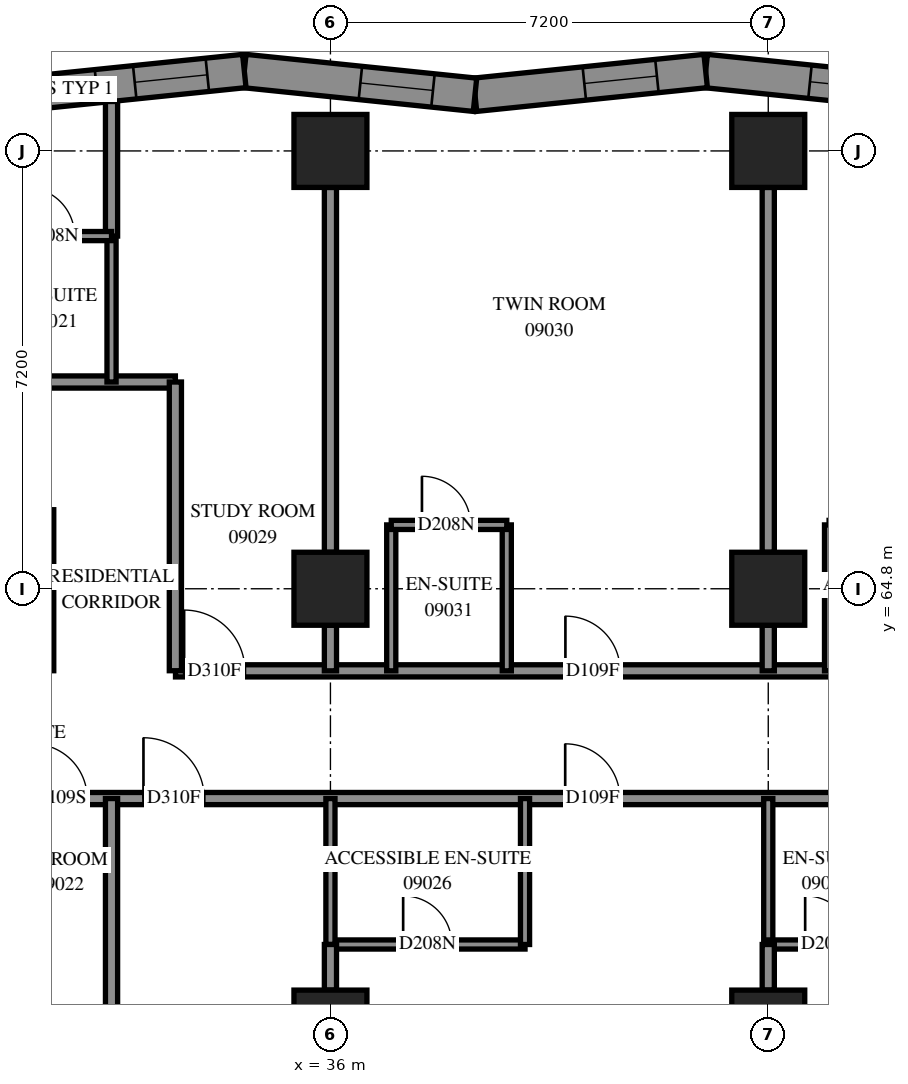
"""IFC4 building model, lengths in metres.
Left out: names, types, materials, properties, quantities, classifications, styles, units other than length and angle.
Written with IfcOpenShell. Run it as: python <this file> out.ifc"""

import sys

from ifc_helpers import new_model, si_unit, direction, frame, frame_2d, origin, origin_2d, place, context, subcontext, project, spatial, polyline, rectangle, outline, extrude, element, fill, save


model = new_model("IFC4")
c1 = context("Model", 3, precision=1e-05, world=origin(), true_north=direction((0.0, 1.0)))
c2 = subcontext(c1, "Body", "Model", "MODEL_VIEW")
j1 = project(units=[si_unit("LENGTHUNIT", "METRE"), si_unit("PLANEANGLEUNIT", "RADIAN")], contexts=[c1])
p1 = place(None, origin())
s1 = spatial("IfcSite", under=j1, at=p1, CompositionType="ELEMENT")
p2 = place(p1, origin())
s2 = spatial("IfcBuilding", under=s1, at=p2, CompositionType="ELEMENT")
p3 = place(p2, frame((0.0, 0.0, 37.2)))
s3 = spatial("IfcBuildingStorey", under=s2, at=p3, CompositionType="ELEMENT", Elevation=37.2)
for number, where, z_axis, x_axis in (
    (1, (36.0, 57.6, 0.0), (0.0, 0.0, 1.0), (1.0, 0.0, 0.0)),
    (2, (36.0, 64.8, 0.0), (0.0, 0.0, 1.0), (1.0, 0.0, 0.0)),
    (3, (36.0, 72.0, 0.0), (0.0, 0.0, 1.0), (1.0, 0.0, 0.0)),
    (4, (43.2, 57.6, 0.0), (0.0, 0.0, 1.0), (1.0, 0.0, 0.0)),
    (5, (43.2, 64.8, 0.0), (0.0, 0.0, 1.0), (1.0, 0.0, 0.0)),
    (6, (43.2, 72.0, 0.0), (0.0, 0.0, 1.0), (1.0, 0.0, 0.0)),
):
    element("IfcColumn", number, at=place(p3, frame(where, z_axis=z_axis, x_axis=x_axis)), inside=s3, PredefinedType="COLUMN", context=c2, shape_type="SweptSolid", body=[
        extrude(rectangle(XDim=1.2, YDim=1.2, at=origin_2d()), origin(), (0.0, 0.0, 1.0), 3.1),
    ])
p4 = place(p3, frame((45.965, 72.924, 0.0), z_axis=(0.0, 0.0, 1.0), x_axis=(-0.9947304076, 0.1025251975, 0.0)))
e7 = element("IfcWall", 7, at=p4, inside=s3, PredefinedType="SOLIDWALL", context=c2, shape_type="SweptSolid", body=[
    extrude(outline(polyline([(0.028, -0.275), (3.842, -0.275), (3.785, 0.275), (-0.028, 0.275), (0.028, -0.275)])), origin(), (0.0, 0.0, 1.0), 3.1),
])
p5 = place(p4, frame((0.89, 0.0, 0.5)))
e8 = element("IfcOpeningElement", 8, at=p5, cuts=e7, PredefinedType="OPENING", context=c2, shape_type="SweptSolid", body=[
    extrude(rectangle(XDim=1.2, YDim=2.45, at=frame_2d((0.6, 1.225))), frame((0.0, 0.285, 0.0), z_axis=(0.0, -1.0, 0.0), x_axis=(1.0, 0.0, 0.0)), (0.0, 0.0, 1.0), 0.57),
])
p6 = place(p3, frame((42.171, 73.314, 0.0), z_axis=(0.0, 0.0, 1.0), x_axis=(-0.9947306832, -0.1025225234, 0.0)))
e9 = element("IfcWall", 9, at=p6, inside=s3, PredefinedType="SOLIDWALL", context=c2, shape_type="SweptSolid", body=[
    extrude(outline(polyline([(-0.028, -0.275), (3.785, -0.275), (3.842, 0.275), (0.028, 0.275), (-0.028, -0.275)])), origin(), (0.0, 0.0, 1.0), 3.1),
])
p7 = place(p6, frame((0.806, 0.0, 0.5)))
e10 = element("IfcOpeningElement", 10, at=p7, cuts=e9, PredefinedType="OPENING", context=c2, shape_type="SweptSolid", body=[
    extrude(rectangle(XDim=1.2, YDim=2.45, at=frame_2d((0.6, 1.225))), frame((0.0, 0.285, 0.0), z_axis=(0.0, -1.0, 0.0), x_axis=(1.0, 0.0, 0.0)), (0.0, 0.0, 1.0), 0.57),
])
p8 = place(p3, frame((38.377, 72.924, 0.0), z_axis=(0.0, 0.0, 1.0), x_axis=(-0.9947306832, 0.1025225234, 0.0)))
e11 = element("IfcWall", 11, at=p8, inside=s3, PredefinedType="SOLIDWALL", context=c2, shape_type="SweptSolid", body=[
    extrude(outline(polyline([(0.028, -0.275), (3.842, -0.275), (3.785, 0.275), (-0.028, 0.275), (0.028, -0.275)])), origin(), (0.0, 0.0, 1.0), 3.1),
])
p9 = place(p8, frame((0.695, 0.0, 0.5)))
e12 = element("IfcOpeningElement", 12, at=p9, cuts=e11, PredefinedType="OPENING", context=c2, shape_type="SweptSolid", body=[
    extrude(rectangle(XDim=1.2, YDim=2.45, at=frame_2d((0.6, 1.225))), frame((0.0, 0.285, 0.0), z_axis=(0.0, -1.0, 0.0), x_axis=(1.0, 0.0, 0.0)), (0.0, 0.0, 1.0), 0.57),
])
p10 = place(p3, frame((34.584, 73.314, 0.0), z_axis=(0.0, 0.0, 1.0), x_axis=(-0.9947304076, -0.1025251975, 0.0)))
e13 = element("IfcWall", 13, at=p10, inside=s3, PredefinedType="SOLIDWALL", context=c2, shape_type="SweptSolid", body=[
    extrude(outline(polyline([(-0.028, -0.275), (3.785, -0.275), (3.842, 0.275), (0.028, 0.275), (-0.028, -0.275)])), origin(), (0.0, 0.0, 1.0), 3.1),
])
p11 = place(p10, frame((0.612, 0.0, 0.5)))
e14 = element("IfcOpeningElement", 14, at=p11, cuts=e13, PredefinedType="OPENING", context=c2, shape_type="SweptSolid", body=[
    extrude(rectangle(XDim=1.2, YDim=2.45, at=frame_2d((0.6, 1.225))), frame((0.0, 0.285, 0.0), z_axis=(0.0, -1.0, 0.0), x_axis=(1.0, 0.0, 0.0)), (0.0, 0.0, 1.0), 0.57),
])
p12 = place(p10, frame((2.444, 0.0, 0.45)))
e15 = element("IfcOpeningElement", 15, at=p12, cuts=e13, PredefinedType="OPENING", context=c2, shape_type="SweptSolid", body=[
    extrude(rectangle(XDim=1.0, YDim=2.5, at=frame_2d((0.5, 1.25))), frame((0.0, 0.285, 0.0), z_axis=(0.0, -1.0, 0.0), x_axis=(1.0, 0.0, 0.0)), (0.0, 0.0, 1.0), 0.57),
])
p13 = place(p3, frame((28.8, 61.35, 0.0), z_axis=(0.0, 0.0, 1.0), x_axis=(1.0, 0.0, 0.0)))
e16 = element("IfcWall", 16, at=p13, inside=s3, PredefinedType="PARTITIONING", context=c2, shape_type="SweptSolid", body=[
    extrude(rectangle(XDim=24.15, YDim=0.2, at=frame_2d((12.075, 0.0))), origin(), (0.0, 0.0, 1.0), 3.1),
])
p14 = place(p13, frame((2.3, 0.0, 0.0)))
e17 = element("IfcOpeningElement", 17, at=p14, cuts=e16, PredefinedType="OPENING", context=c2, shape_type="SweptSolid", body=[
    extrude(rectangle(XDim=0.9, YDim=2.1, at=frame_2d((0.45, 1.05))), frame((0.0, 0.11, 0.0), z_axis=(0.0, -1.0, 0.0), x_axis=(1.0, 0.0, 0.0)), (0.0, 0.0, 1.0), 0.22),
])
p15 = place(p13, frame((4.125, 0.0, 0.0)))
e18 = element("IfcOpeningElement", 18, at=p15, cuts=e16, PredefinedType="OPENING", context=c2, shape_type="SweptSolid", body=[
    extrude(rectangle(XDim=1.0, YDim=2.1, at=frame_2d((0.5, 1.05))), frame((0.0, 0.11, 0.0), z_axis=(0.0, -1.0, 0.0), x_axis=(1.0, 0.0, 0.0)), (0.0, 0.0, 1.0), 0.22),
])
p16 = place(p13, frame((11.061, 0.0, 0.0)))
e19 = element("IfcOpeningElement", 19, at=p16, cuts=e16, PredefinedType="OPENING", context=c2, shape_type="SweptSolid", body=[
    extrude(rectangle(XDim=0.9, YDim=2.1, at=frame_2d((0.45, 1.05))), frame((0.0, 0.11, 0.0), z_axis=(0.0, -1.0, 0.0), x_axis=(1.0, 0.0, 0.0)), (0.0, 0.0, 1.0), 0.22),
])
p17 = place(p13, frame((16.7, 0.0, 0.0)))
e20 = element("IfcOpeningElement", 20, at=p17, cuts=e16, PredefinedType="OPENING", context=c2, shape_type="SweptSolid", body=[
    extrude(rectangle(XDim=0.9, YDim=2.1, at=frame_2d((0.45, 1.05))), frame((0.0, 0.11, 0.0), z_axis=(0.0, -1.0, 0.0), x_axis=(1.0, 0.0, 0.0)), (0.0, 0.0, 1.0), 0.22),
])
p18 = place(p13, frame((18.508, 0.0, 0.0)))
e21 = element("IfcOpeningElement", 21, at=p18, cuts=e16, PredefinedType="OPENING", context=c2, shape_type="SweptSolid", body=[
    extrude(rectangle(XDim=1.0, YDim=2.1, at=frame_2d((0.5, 1.05))), frame((0.0, 0.11, 0.0), z_axis=(0.0, -1.0, 0.0), x_axis=(1.0, 0.0, 0.0)), (0.0, 0.0, 1.0), 0.22),
])
p19 = place(p13, frame((22.882, 0.0, 0.0)))
e22 = element("IfcOpeningElement", 22, at=p19, cuts=e16, PredefinedType="OPENING", context=c2, shape_type="SweptSolid", body=[
    extrude(rectangle(XDim=1.0, YDim=2.1, at=frame_2d((0.5, 1.05))), frame((0.0, 0.11, 0.0), z_axis=(0.0, -1.0, 0.0), x_axis=(1.0, 0.0, 0.0)), (0.0, 0.0, 1.0), 0.22),
])
p20 = place(p3, frame((33.452, 63.45, 0.0), z_axis=(0.0, 0.0, 1.0), x_axis=(1.0, 0.0, 0.0)))
e23 = element("IfcWall", 23, at=p20, inside=s3, PredefinedType="PARTITIONING", context=c2, shape_type="SweptSolid", body=[
    extrude(rectangle(XDim=21.648, YDim=0.2, at=frame_2d((10.824, 0.0))), origin(), (0.0, 0.0, 1.0), 3.1),
])
p21 = place(p20, frame((0.142, 0.0, 0.0)))
e24 = element("IfcOpeningElement", 24, at=p21, cuts=e23, PredefinedType="OPENING", context=c2, shape_type="SweptSolid", body=[
    extrude(rectangle(XDim=1.0, YDim=2.1, at=frame_2d((0.5, 1.05))), frame((0.0, 0.11, 0.0), z_axis=(0.0, -1.0, 0.0), x_axis=(1.0, 0.0, 0.0)), (0.0, 0.0, 1.0), 0.22),
])
p22 = place(p20, frame((6.412, 0.0, 0.0)))
e25 = element("IfcOpeningElement", 25, at=p22, cuts=e23, PredefinedType="OPENING", context=c2, shape_type="SweptSolid", body=[
    extrude(rectangle(XDim=0.9, YDim=2.1, at=frame_2d((0.45, 1.05))), frame((0.0, 0.11, 0.0), z_axis=(0.0, -1.0, 0.0), x_axis=(1.0, 0.0, 0.0)), (0.0, 0.0, 1.0), 0.22),
])
p23 = place(p20, frame((14.168, 0.0, 0.0)))
e26 = element("IfcOpeningElement", 26, at=p23, cuts=e23, PredefinedType="OPENING", context=c2, shape_type="SweptSolid", body=[
    extrude(rectangle(XDim=0.9, YDim=2.1, at=frame_2d((0.45, 1.05))), frame((0.0, 0.11, 0.0), z_axis=(0.0, -1.0, 0.0), x_axis=(1.0, 0.0, 0.0)), (0.0, 0.0, 1.0), 0.22),
])
p24 = place(p20, frame((17.651, 0.0, 0.0)))
e27 = element("IfcOpeningElement", 27, at=p24, cuts=e23, PredefinedType="OPENING", context=c2, shape_type="SweptSolid", body=[
    extrude(rectangle(XDim=0.9, YDim=2.1, at=frame_2d((0.45, 1.05))), frame((0.0, 0.11, 0.0), z_axis=(0.0, -1.0, 0.0), x_axis=(1.0, 0.0, 0.0)), (0.0, 0.0, 1.0), 0.22),
])
p25 = place(p3, frame((21.602, 68.2, 0.0), z_axis=(0.0, 0.0, 1.0), x_axis=(1.0, 0.0, 0.0)))
e28 = element("IfcWall", 28, at=p25, inside=s3, PredefinedType="PARTITIONING", context=c2, shape_type="SweptSolid", body=[
    extrude(rectangle(XDim=11.848, YDim=0.2, at=frame_2d((5.924, 0.0))), origin(), (0.0, 0.0, 1.0), 3.1),
])
p26 = place(p25, frame((5.855, 0.0, 0.0)))
e29 = element("IfcOpeningElement", 29, at=p26, cuts=e28, PredefinedType="OPENING", context=c2, shape_type="SweptSolid", body=[
    extrude(rectangle(XDim=0.9, YDim=2.1, at=frame_2d((0.45, 1.05))), frame((0.0, 0.11, 0.0), z_axis=(0.0, -1.0, 0.0), x_axis=(1.0, 0.0, 0.0)), (0.0, 0.0, 1.0), 0.22),
])
for number, where, z_axis, x_axis in (
    (30, (36.0, 65.4, 0.0), (0.0, 0.0, 1.0), (0.0, 1.0, 0.0)),
    (31, (43.2, 65.4, 0.0), (0.0, 0.0, 1.0), (0.0, 1.0, 0.0)),
):
    element("IfcWall", number, at=place(p3, frame(where, z_axis=z_axis, x_axis=x_axis)), inside=s3, PredefinedType="PARTITIONING", context=c2, shape_type="SweptSolid", body=[
        extrude(rectangle(XDim=6.0, YDim=0.2, at=frame_2d((3.0, 0.0))), origin(), (0.0, 0.0, 1.0), 3.1),
    ])
p27 = place(p3, frame((33.45, 63.452, 0.0), z_axis=(0.0, 0.0, 1.0), x_axis=(0.0, 1.0, 0.0)))
e32 = element("IfcWall", 32, at=p27, inside=s3, PredefinedType="PARTITIONING", context=c2, shape_type="SweptSolid", body=[
    extrude(rectangle(XDim=4.748, YDim=0.2, at=frame_2d((2.374, 0.0))), origin(), (0.0, 0.0, 1.0), 3.1),
])
p28 = place(p3, frame((32.4, 56.95, 0.0), z_axis=(0.0, 0.0, 1.0), x_axis=(0.0, 1.0, 0.0)))
e33 = element("IfcWall", 33, at=p28, inside=s3, PredefinedType="PARTITIONING", context=c2, shape_type="SweptSolid", body=[
    extrude(rectangle(XDim=4.4, YDim=0.2, at=frame_2d((2.2, 0.0))), origin(), (0.0, 0.0, 1.0), 3.1),
])
p29 = place(p3, frame((36.0, 58.95, 0.0), z_axis=(0.0, 0.0, 1.0), x_axis=(1.0, 0.0, 0.0)))
e34 = element("IfcWall", 34, at=p29, inside=s3, PredefinedType="PARTITIONING", context=c2, shape_type="SweptSolid", body=[
    extrude(rectangle(XDim=3.2, YDim=0.15, at=frame_2d((1.6, 0.0))), origin(), (0.0, 0.0, 1.0), 3.1),
])
p30 = place(p29, frame((1.196, 0.0, 0.0)))
e35 = element("IfcOpeningElement", 35, at=p30, cuts=e34, PredefinedType="OPENING", context=c2, shape_type="SweptSolid", body=[
    extrude(rectangle(XDim=0.8, YDim=2.1, at=frame_2d((0.4, 1.05))), frame((0.0, 0.085, 0.0), z_axis=(0.0, -1.0, 0.0), x_axis=(1.0, 0.0, 0.0)), (0.0, 0.0, 1.0), 0.17),
])
p31 = place(p3, frame((31.35, 63.452, 0.0), z_axis=(0.0, 0.0, 1.0), x_axis=(0.0, 1.0, 0.0)))
e36 = element("IfcWall", 36, at=p31, inside=s3, PredefinedType="PARTITIONING", context=c2, shape_type="SweptSolid", body=[
    extrude(rectangle(XDim=2.648, YDim=0.2, at=frame_2d((1.324, 0.0))), origin(), (0.0, 0.0, 1.0), 3.1),
])
for number, where, z_axis, x_axis in (
    (37, (39.2, 58.95, 0.0), (0.0, 0.0, 1.0), (0.0, 1.0, 0.0)),
    (38, (36.0, 58.95, 0.0), (0.0, 0.0, 1.0), (0.0, 1.0, 0.0)),
    (39, (43.2, 58.95, 0.0), (0.0, 0.0, 1.0), (0.0, 1.0, 0.0)),
    (40, (32.4, 68.2, 0.0), (0.0, 0.0, 1.0), (0.0, 1.0, 0.0)),
    (41, (37.0, 63.45, 0.0), (0.0, 0.0, 1.0), (0.0, 1.0, 0.0)),
    (42, (38.9, 63.45, 0.0), (0.0, 0.0, 1.0), (0.0, 1.0, 0.0)),
    (43, (44.2, 63.45, 0.0), (0.0, 0.0, 1.0), (0.0, 1.0, 0.0)),
):
    element("IfcWall", number, at=place(p3, frame(where, z_axis=z_axis, x_axis=x_axis)), inside=s3, PredefinedType="PARTITIONING", context=c2, shape_type="SweptSolid", body=[
        extrude(rectangle(XDim=2.4, YDim=0.15, at=frame_2d((1.2, 0.0))), origin(), (0.0, 0.0, 1.0), 3.1),
    ])
p32 = place(p3, frame((32.4, 70.6, 0.0), z_axis=(0.0, 0.0, 1.0), x_axis=(0.0, 1.0, 0.0)))
e44 = element("IfcWall", 44, at=p32, inside=s3, PredefinedType="PARTITIONING", context=c2, shape_type="SweptSolid", body=[
    extrude(rectangle(XDim=2.213, YDim=0.2, at=frame_2d((1.107, 0.0))), origin(), (0.0, 0.0, 1.0), 3.1),
])
p33 = place(p3, frame((43.2, 58.95, 0.0), z_axis=(0.0, 0.0, 1.0), x_axis=(1.0, 0.0, 0.0)))
e45 = element("IfcWall", 45, at=p33, inside=s3, PredefinedType="PARTITIONING", context=c2, shape_type="SweptSolid", body=[
    extrude(rectangle(XDim=1.9, YDim=0.15, at=frame_2d((0.95, 0.0))), origin(), (0.0, 0.0, 1.0), 3.1),
])
p34 = place(p33, frame((0.607, 0.0, 0.0)))
e46 = element("IfcOpeningElement", 46, at=p34, cuts=e45, PredefinedType="OPENING", context=c2, shape_type="SweptSolid", body=[
    extrude(rectangle(XDim=0.8, YDim=2.1, at=frame_2d((0.4, 1.05))), frame((0.0, 0.085, 0.0), z_axis=(0.0, -1.0, 0.0), x_axis=(1.0, 0.0, 0.0)), (0.0, 0.0, 1.0), 0.17),
])
p35 = place(p3, frame((30.5, 70.6, 0.0), z_axis=(0.0, 0.0, 1.0), x_axis=(1.0, 0.0, 0.0)))
e47 = element("IfcWall", 47, at=p35, inside=s3, PredefinedType="PARTITIONING", context=c2, shape_type="SweptSolid", body=[
    extrude(rectangle(XDim=1.9, YDim=0.15, at=frame_2d((0.95, 0.0))), origin(), (0.0, 0.0, 1.0), 3.1),
])
p36 = place(p35, frame((0.493, 0.0, 0.0)))
e48 = element("IfcOpeningElement", 48, at=p36, cuts=e47, PredefinedType="OPENING", context=c2, shape_type="SweptSolid", body=[
    extrude(rectangle(XDim=0.8, YDim=2.1, at=frame_2d((0.4, 1.05))), frame((0.0, 0.085, 0.0), z_axis=(0.0, -1.0, 0.0), x_axis=(1.0, 0.0, 0.0)), (0.0, 0.0, 1.0), 0.17),
])
p37 = place(p3, frame((37.0, 65.85, 0.0), z_axis=(0.0, 0.0, 1.0), x_axis=(1.0, 0.0, 0.0)))
e49 = element("IfcWall", 49, at=p37, inside=s3, PredefinedType="PARTITIONING", context=c2, shape_type="SweptSolid", body=[
    extrude(rectangle(XDim=1.9, YDim=0.15, at=frame_2d((0.95, 0.0))), origin(), (0.0, 0.0, 1.0), 3.1),
])
p38 = place(p37, frame((0.505, 0.0, 0.0)))
e50 = element("IfcOpeningElement", 50, at=p38, cuts=e49, PredefinedType="OPENING", context=c2, shape_type="SweptSolid", body=[
    extrude(rectangle(XDim=0.8, YDim=2.1, at=frame_2d((0.4, 1.05))), frame((0.0, 0.085, 0.0), z_axis=(0.0, -1.0, 0.0), x_axis=(1.0, 0.0, 0.0)), (0.0, 0.0, 1.0), 0.17),
])
for number, where, z_axis, x_axis in (
    (51, (36.0, 58.2, 0.0), (0.0, 0.0, 1.0), (0.0, 1.0, 0.0)),
    (52, (36.0, 63.45, 0.0), (0.0, 0.0, 1.0), (0.0, 1.0, 0.0)),
    (53, (43.2, 58.2, 0.0), (0.0, 0.0, 1.0), (0.0, 1.0, 0.0)),
    (54, (43.2, 63.45, 0.0), (0.0, 0.0, 1.0), (0.0, 1.0, 0.0)),
):
    element("IfcWall", number, at=place(p3, frame(where, z_axis=z_axis, x_axis=x_axis)), inside=s3, PredefinedType="PARTITIONING", context=c2, shape_type="SweptSolid", body=[
        extrude(rectangle(XDim=0.75, YDim=0.2, at=frame_2d((0.375, 0.0))), origin(), (0.0, 0.0, 1.0), 3.1),
    ])
p39 = place(p5, origin())
e55 = element("IfcWindow", 55, at=p39, inside=s3, PartitioningType="SINGLE_PANEL", PredefinedType="WINDOW", context=c2, shape_type="SweptSolid", body=[
    extrude(rectangle(XDim=1.2, YDim=2.45, at=frame_2d((0.6, 1.225))), frame((0.0, 0.155, 0.0), z_axis=(0.0, -1.0, 0.0), x_axis=(1.0, 0.0, 0.0)), (0.0, 0.0, 1.0), 0.06),
])
fill(e8, e55)
p40 = place(p7, origin())
e56 = element("IfcWindow", 56, at=p40, inside=s3, PartitioningType="SINGLE_PANEL", PredefinedType="WINDOW", context=c2, shape_type="SweptSolid", body=[
    extrude(rectangle(XDim=1.2, YDim=2.45, at=frame_2d((0.6, 1.225))), frame((0.0, 0.155, 0.0), z_axis=(0.0, -1.0, 0.0), x_axis=(1.0, 0.0, 0.0)), (0.0, 0.0, 1.0), 0.06),
])
fill(e10, e56)
p41 = place(p9, origin())
e57 = element("IfcWindow", 57, at=p41, inside=s3, PartitioningType="SINGLE_PANEL", PredefinedType="WINDOW", context=c2, shape_type="SweptSolid", body=[
    extrude(rectangle(XDim=1.2, YDim=2.45, at=frame_2d((0.6, 1.225))), frame((0.0, 0.155, 0.0), z_axis=(0.0, -1.0, 0.0), x_axis=(1.0, 0.0, 0.0)), (0.0, 0.0, 1.0), 0.06),
])
fill(e12, e57)
p42 = place(p11, origin())
e58 = element("IfcWindow", 58, at=p42, inside=s3, PartitioningType="SINGLE_PANEL", PredefinedType="WINDOW", context=c2, shape_type="SweptSolid", body=[
    extrude(rectangle(XDim=1.2, YDim=2.45, at=frame_2d((0.6, 1.225))), frame((0.0, 0.155, 0.0), z_axis=(0.0, -1.0, 0.0), x_axis=(1.0, 0.0, 0.0)), (0.0, 0.0, 1.0), 0.06),
])
fill(e14, e58)
p43 = place(p36, origin())
e59 = element("IfcDoor", 59, at=p43, inside=s3, OperationType="SINGLE_SWING_RIGHT", PredefinedType="DOOR", context=c2, shape_type="SweptSolid", body=[
    extrude(rectangle(XDim=0.8, YDim=2.1, at=frame_2d((0.4, 1.05))), frame((0.0, 0.025, 0.0), z_axis=(0.0, -1.0, 0.0), x_axis=(1.0, 0.0, 0.0)), (0.0, 0.0, 1.0), 0.05),
])
fill(e48, e59)
p44 = place(p14, origin())
e60 = element("IfcDoor", 60, at=p44, inside=s3, OperationType="SINGLE_SWING_LEFT", PredefinedType="DOOR", context=c2, shape_type="SweptSolid", body=[
    extrude(rectangle(XDim=0.9, YDim=2.1, at=frame_2d((0.45, 1.05))), frame((0.0, 0.025, 0.0), z_axis=(0.0, -1.0, 0.0), x_axis=(1.0, 0.0, 0.0)), (0.0, 0.0, 1.0), 0.05),
])
fill(e17, e60)
p45 = place(p15, origin())
e61 = element("IfcDoor", 61, at=p45, inside=s3, OperationType="SINGLE_SWING_RIGHT", PredefinedType="DOOR", context=c2, shape_type="SweptSolid", body=[
    extrude(rectangle(XDim=1.0, YDim=2.1, at=frame_2d((0.5, 1.05))), frame((0.0, 0.025, 0.0), z_axis=(0.0, -1.0, 0.0), x_axis=(1.0, 0.0, 0.0)), (0.0, 0.0, 1.0), 0.05),
])
fill(e18, e61)
p46 = place(p16, origin())
e62 = element("IfcDoor", 62, at=p46, inside=s3, OperationType="SINGLE_SWING_LEFT", PredefinedType="DOOR", context=c2, shape_type="SweptSolid", body=[
    extrude(rectangle(XDim=0.9, YDim=2.1, at=frame_2d((0.45, 1.05))), frame((0.0, 0.025, 0.0), z_axis=(0.0, -1.0, 0.0), x_axis=(1.0, 0.0, 0.0)), (0.0, 0.0, 1.0), 0.05),
])
fill(e19, e62)
p47 = place(p30, origin())
e63 = element("IfcDoor", 63, at=p47, inside=s3, OperationType="SINGLE_SWING_RIGHT", PredefinedType="DOOR", context=c2, shape_type="SweptSolid", body=[
    extrude(rectangle(XDim=0.8, YDim=2.1, at=frame_2d((0.4, 1.05))), frame((0.0, 0.025, 0.0), z_axis=(0.0, -1.0, 0.0), x_axis=(1.0, 0.0, 0.0)), (0.0, 0.0, 1.0), 0.05),
])
fill(e35, e63)
p48 = place(p34, origin())
e64 = element("IfcDoor", 64, at=p48, inside=s3, OperationType="SINGLE_SWING_RIGHT", PredefinedType="DOOR", context=c2, shape_type="SweptSolid", body=[
    extrude(rectangle(XDim=0.8, YDim=2.1, at=frame_2d((0.4, 1.05))), frame((0.0, 0.025, 0.0), z_axis=(0.0, -1.0, 0.0), x_axis=(1.0, 0.0, 0.0)), (0.0, 0.0, 1.0), 0.05),
])
fill(e46, e64)
p49 = place(p21, origin())
e65 = element("IfcDoor", 65, at=p49, inside=s3, OperationType="SINGLE_SWING_LEFT", PredefinedType="DOOR", context=c2, shape_type="SweptSolid", body=[
    extrude(rectangle(XDim=1.0, YDim=2.1, at=frame_2d((0.5, 1.05))), frame((0.0, 0.025, 0.0), z_axis=(0.0, -1.0, 0.0), x_axis=(1.0, 0.0, 0.0)), (0.0, 0.0, 1.0), 0.05),
])
fill(e24, e65)
p50 = place(p22, origin())
e66 = element("IfcDoor", 66, at=p50, inside=s3, OperationType="SINGLE_SWING_RIGHT", PredefinedType="DOOR", context=c2, shape_type="SweptSolid", body=[
    extrude(rectangle(XDim=0.9, YDim=2.1, at=frame_2d((0.45, 1.05))), frame((0.0, 0.025, 0.0), z_axis=(0.0, -1.0, 0.0), x_axis=(1.0, 0.0, 0.0)), (0.0, 0.0, 1.0), 0.05),
])
fill(e25, e66)
p51 = place(p38, origin())
e67 = element("IfcDoor", 67, at=p51, inside=s3, OperationType="SINGLE_SWING_RIGHT", PredefinedType="DOOR", context=c2, shape_type="SweptSolid", body=[
    extrude(rectangle(XDim=0.8, YDim=2.1, at=frame_2d((0.4, 1.05))), frame((0.0, 0.025, 0.0), z_axis=(0.0, -1.0, 0.0), x_axis=(1.0, 0.0, 0.0)), (0.0, 0.0, 1.0), 0.05),
])
fill(e50, e67)
p52 = place(p12, origin())
e68 = element("IfcWindow", 68, at=p52, inside=s3, PartitioningType="SINGLE_PANEL", PredefinedType="WINDOW", context=c2, shape_type="SweptSolid", body=[
    extrude(rectangle(XDim=1.0, YDim=2.5, at=frame_2d((0.5, 1.25))), frame((0.0, 0.155, 0.0), z_axis=(0.0, -1.0, 0.0), x_axis=(1.0, 0.0, 0.0)), (0.0, 0.0, 1.0), 0.06),
])
fill(e15, e68)
save(model, sys.argv[1])
